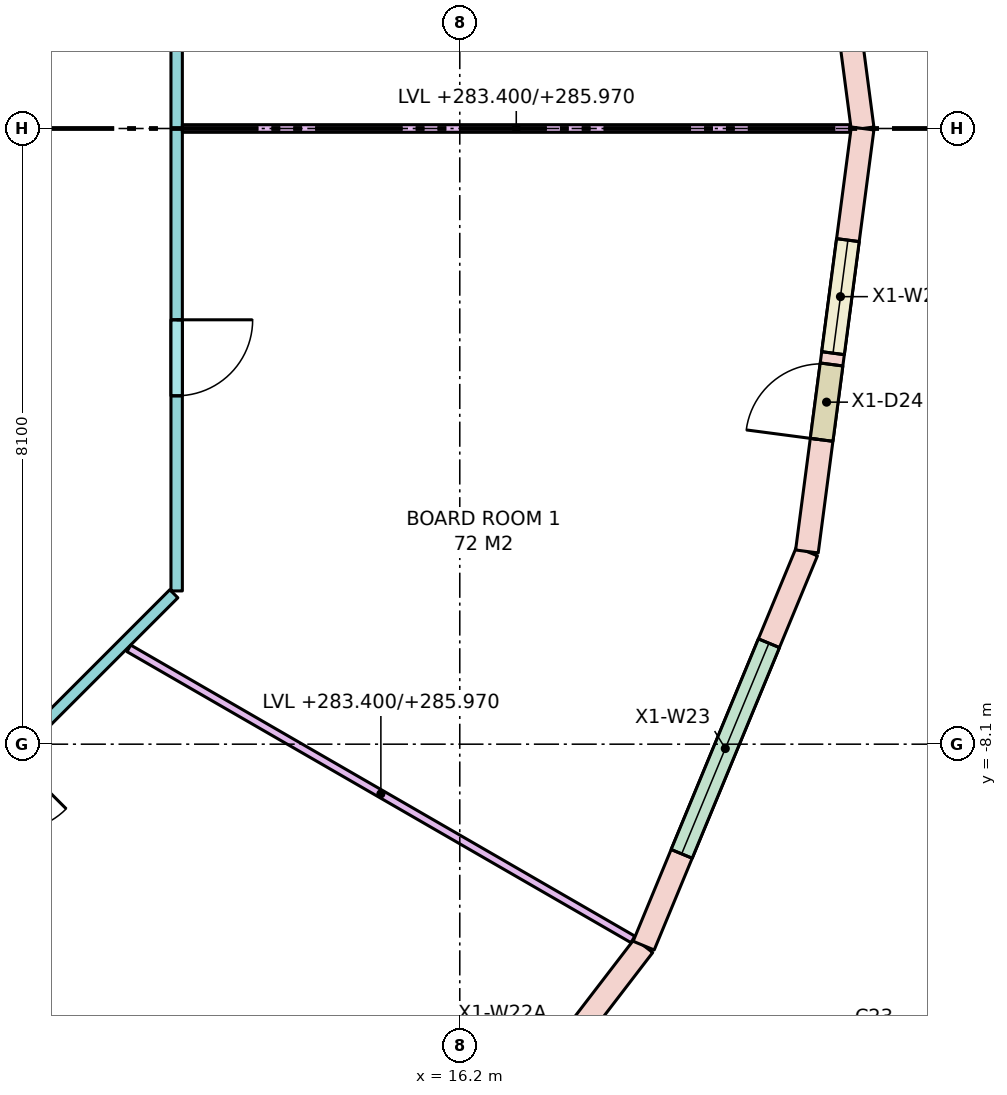
"""IFC4 building model, lengths in metres.
Left out: names, types, materials, properties, quantities, classifications, styles, units other than length and angle.
Written with IfcOpenShell. Run it as: python <this file> out.ifc"""

import sys

from ifc_helpers import new_model, si_unit, direction, frame, frame_2d, origin, place, context, subcontext, project, spatial, rectangle, extrude, element, fill, save


model = new_model("IFC4")
c1 = context("Model", 3, precision=1e-05, world=origin(), true_north=direction((0.0, 1.0)))
c2 = subcontext(c1, "Body", "Model", "MODEL_VIEW")
j1 = project(units=[si_unit("LENGTHUNIT", "METRE"), si_unit("PLANEANGLEUNIT", "RADIAN")], contexts=[c1])
p1 = place(None, origin())
s1 = spatial("IfcSite", under=j1, at=p1, CompositionType="ELEMENT")
p2 = place(p1, origin())
s2 = spatial("IfcBuilding", under=s1, at=p2, CompositionType="ELEMENT")
p3 = place(p2, frame((0.0, 0.0, 283.4)))
s3 = spatial("IfcBuildingStorey", under=s2, at=p3, CompositionType="ELEMENT", Elevation=283.4)
p4 = place(p3, frame((21.5, 0.0, 0.0), z_axis=(0.0, 0.0, 1.0), x_axis=(-0.130536651449, 0.991443484334, 0.0)))
e1 = element("IfcWall", 1, at=p4, inside=s3, PredefinedType="STANDARD", context=c2, shape_type="SweptSolid", body=[
    extrude(rectangle(XDim=5.613, YDim=0.3, at=frame_2d((2.806, 0.0))), origin(), (0.0, 0.0, 1.0), 3.42),
])
p5 = place(p4, frame((1.306, 0.0, 0.8)))
e2 = element("IfcOpeningElement", 2, at=p5, cuts=e1, PredefinedType="OPENING", context=c2, shape_type="SweptSolid", body=[
    extrude(rectangle(XDim=3.0, YDim=2.4, at=frame_2d((1.5, 1.2))), frame((0.0, 0.16, 0.0), z_axis=(0.0, -1.0, 0.0), x_axis=(1.0, 0.0, 0.0)), (0.0, 0.0, 1.0), 0.32),
])
p6 = place(p3, frame((15.203, -15.203, 0.0), z_axis=(0.0, 0.0, 1.0), x_axis=(0.608726467567, 0.793380165925, 0.0)))
e3 = element("IfcWall", 3, at=p6, inside=s3, PredefinedType="STANDARD", context=c2, shape_type="SweptSolid", body=[
    extrude(rectangle(XDim=5.613, YDim=0.3, at=frame_2d((2.806, 0.0))), origin(), (0.0, 0.0, 1.0), 3.42),
])
p7 = place(p6, frame((1.481, 0.0, 0.0)))
e4 = element("IfcOpeningElement", 4, at=p7, cuts=e3, PredefinedType="OPENING", context=c2, shape_type="SweptSolid", body=[
    extrude(rectangle(XDim=1.0, YDim=2.4, at=frame_2d((0.5, 1.2))), frame((0.0, 0.16, 0.0), z_axis=(0.0, -1.0, 0.0), x_axis=(1.0, 0.0, 0.0)), (0.0, 0.0, 1.0), 0.32),
])
p8 = place(p6, frame((2.631, 0.0, 0.8)))
e5 = element("IfcOpeningElement", 5, at=p8, cuts=e3, PredefinedType="OPENING", context=c2, shape_type="SweptSolid", body=[
    extrude(rectangle(XDim=1.5, YDim=2.4, at=frame_2d((0.75, 1.2))), frame((0.0, 0.16, 0.0), z_axis=(0.0, -1.0, 0.0), x_axis=(1.0, 0.0, 0.0)), (0.0, 0.0, 1.0), 0.32),
])
p9 = place(p3, frame((18.619, -10.75, 0.0), z_axis=(0.0, 0.0, 1.0), x_axis=(0.382702670405, 0.92387156362, 0.0)))
e6 = element("IfcWall", 6, at=p9, inside=s3, PredefinedType="STANDARD", context=c2, shape_type="SweptSolid", body=[
    extrude(rectangle(XDim=5.613, YDim=0.3, at=frame_2d((2.806, 0.0))), origin(), (0.0, 0.0, 1.0), 3.42),
])
p10 = place(p9, frame((1.306, 0.0, 0.8)))
e7 = element("IfcOpeningElement", 7, at=p10, cuts=e6, PredefinedType="OPENING", context=c2, shape_type="SweptSolid", body=[
    extrude(rectangle(XDim=3.0, YDim=2.4, at=frame_2d((1.5, 1.2))), frame((0.0, 0.16, 0.0), z_axis=(0.0, -1.0, 0.0), x_axis=(1.0, 0.0, 0.0)), (0.0, 0.0, 1.0), 0.32),
])
p11 = place(p3, frame((20.767, -5.565, 0.0), z_axis=(0.0, 0.0, 1.0), x_axis=(0.130536651449, 0.991443484334, 0.0)))
e8 = element("IfcWall", 8, at=p11, inside=s3, PredefinedType="STANDARD", context=c2, shape_type="SweptSolid", body=[
    extrude(rectangle(XDim=5.613, YDim=0.3, at=frame_2d((2.806, 0.0))), origin(), (0.0, 0.0, 1.0), 3.42),
])
p12 = place(p11, frame((1.481, 0.0, 0.0)))
e9 = element("IfcOpeningElement", 9, at=p12, cuts=e8, PredefinedType="OPENING", context=c2, shape_type="SweptSolid", body=[
    extrude(rectangle(XDim=1.0, YDim=2.4, at=frame_2d((0.5, 1.2))), frame((0.0, 0.16, 0.0), z_axis=(0.0, -1.0, 0.0), x_axis=(1.0, 0.0, 0.0)), (0.0, 0.0, 1.0), 0.32),
])
p13 = place(p11, frame((2.631, 0.0, 0.8)))
e10 = element("IfcOpeningElement", 10, at=p13, cuts=e8, PredefinedType="OPENING", context=c2, shape_type="SweptSolid", body=[
    extrude(rectangle(XDim=1.5, YDim=2.4, at=frame_2d((0.75, 1.2))), frame((0.0, 0.16, 0.0), z_axis=(0.0, -1.0, 0.0), x_axis=(1.0, 0.0, 0.0)), (0.0, 0.0, 1.0), 0.32),
])
p14 = place(p3, frame((12.438, -6.121, 0.0), z_axis=(0.0, 0.0, 1.0), x_axis=(-0.707106781187, -0.707106781187, 0.0)))
e11 = element("IfcWall", 11, at=p14, inside=s3, PredefinedType="PARTITIONING", context=c2, shape_type="SweptSolid", body=[
    extrude(rectangle(XDim=6.105, YDim=0.15, at=frame_2d((3.053, 0.0))), origin(), (0.0, 0.0, 1.0), 2.57),
])
p15 = place(p14, frame((3.002, 0.0, 0.0)))
e12 = element("IfcOpeningElement", 12, at=p15, cuts=e11, PredefinedType="OPENING", context=c2, shape_type="SweptSolid", body=[
    extrude(rectangle(XDim=1.0, YDim=2.1, at=frame_2d((0.5, 1.05))), frame((0.0, 0.085, 0.0), z_axis=(0.0, -1.0, 0.0), x_axis=(1.0, 0.0, 0.0)), (0.0, 0.0, 1.0), 0.17),
])
p16 = place(p3, frame((12.475, 6.084, 0.0), z_axis=(0.0, 0.0, 1.0), x_axis=(0.0, -1.0, 0.0)))
e13 = element("IfcWall", 13, at=p16, inside=s3, PredefinedType="PARTITIONING", context=c2, shape_type="SweptSolid", body=[
    extrude(rectangle(XDim=12.167, YDim=0.15, at=frame_2d((6.084, 0.0))), origin(), (0.0, 0.0, 1.0), 2.57),
])
p17 = place(p16, frame((8.601, 0.0, 0.0)))
e14 = element("IfcOpeningElement", 14, at=p17, cuts=e13, PredefinedType="OPENING", context=c2, shape_type="SweptSolid", body=[
    extrude(rectangle(XDim=1.0, YDim=2.1, at=frame_2d((0.5, 1.05))), frame((0.0, 0.085, 0.0), z_axis=(0.0, -1.0, 0.0), x_axis=(1.0, 0.0, 0.0)), (0.0, 0.0, 1.0), 0.17),
])
p18 = place(p16, frame((2.167, 0.0, 0.0)))
e15 = element("IfcOpeningElement", 15, at=p18, cuts=e13, PredefinedType="OPENING", context=c2, shape_type="SweptSolid", body=[
    extrude(rectangle(XDim=1.8, YDim=2.1, at=frame_2d((0.9, 1.05))), frame((0.0, 0.085, 0.0), z_axis=(0.0, -1.0, 0.0), x_axis=(1.0, 0.0, 0.0)), (0.0, 0.0, 1.0), 0.17),
])
p19 = place(p3, frame((12.55, 0.0, 0.0), z_axis=(0.0, 0.0, 1.0), x_axis=(1.0, 0.0, 0.0)))
e16 = element("IfcWall", 16, at=p19, inside=s3, PredefinedType="PARTITIONING", context=c2, shape_type="SweptSolid", body=[
    extrude(rectangle(XDim=8.787, YDim=0.1, at=frame_2d((4.393, 0.0))), origin(), (0.0, 0.0, 1.0), 2.57),
])
p20 = place(p3, frame((11.846, -6.839, 0.0), z_axis=(0.0, 0.0, 1.0), x_axis=(0.866007734672, -0.500030602552, 0.0)))
e17 = element("IfcWall", 17, at=p20, inside=s3, PredefinedType="PARTITIONING", context=c2, shape_type="SweptSolid", body=[
    extrude(rectangle(XDim=7.658, YDim=0.1, at=frame_2d((3.829, 0.0))), origin(), (0.0, 0.0, 1.0), 2.57),
])
p21 = place(p10, origin())
e18 = element("IfcWindow", 18, at=p21, inside=s3, PartitioningType="SINGLE_PANEL", PredefinedType="WINDOW", context=c2, shape_type="SweptSolid", body=[
    extrude(rectangle(XDim=3.0, YDim=2.4, at=frame_2d((1.5, 1.2))), frame((0.0, 0.03, 0.0), z_axis=(0.0, -1.0, 0.0), x_axis=(1.0, 0.0, 0.0)), (0.0, 0.0, 1.0), 0.06),
])
fill(e7, e18)
p22 = place(p12, origin())
e19 = element("IfcDoor", 19, at=p22, inside=s3, OperationType="SINGLE_SWING_LEFT", PredefinedType="DOOR", context=c2, shape_type="SweptSolid", body=[
    extrude(rectangle(XDim=1.0, YDim=2.4, at=frame_2d((0.5, 1.2))), frame((0.0, 0.025, 0.0), z_axis=(0.0, -1.0, 0.0), x_axis=(1.0, 0.0, 0.0)), (0.0, 0.0, 1.0), 0.05),
])
fill(e9, e19)
p23 = place(p13, origin())
e20 = element("IfcWindow", 20, at=p23, inside=s3, PartitioningType="SINGLE_PANEL", PredefinedType="WINDOW", context=c2, shape_type="SweptSolid", body=[
    extrude(rectangle(XDim=1.5, YDim=2.4, at=frame_2d((0.75, 1.2))), frame((0.0, 0.03, 0.0), z_axis=(0.0, -1.0, 0.0), x_axis=(1.0, 0.0, 0.0)), (0.0, 0.0, 1.0), 0.06),
])
fill(e10, e20)
p24 = place(p17, origin())
e21 = element("IfcDoor", 21, at=p24, inside=s3, OperationType="SINGLE_SWING_LEFT", PredefinedType="DOOR", context=c2, shape_type="SweptSolid", body=[
    extrude(rectangle(XDim=1.0, YDim=2.1, at=frame_2d((0.5, 1.05))), frame((0.0, 0.025, 0.0), z_axis=(0.0, -1.0, 0.0), x_axis=(1.0, 0.0, 0.0)), (0.0, 0.0, 1.0), 0.05),
])
fill(e14, e21)
save(model, sys.argv[1])
